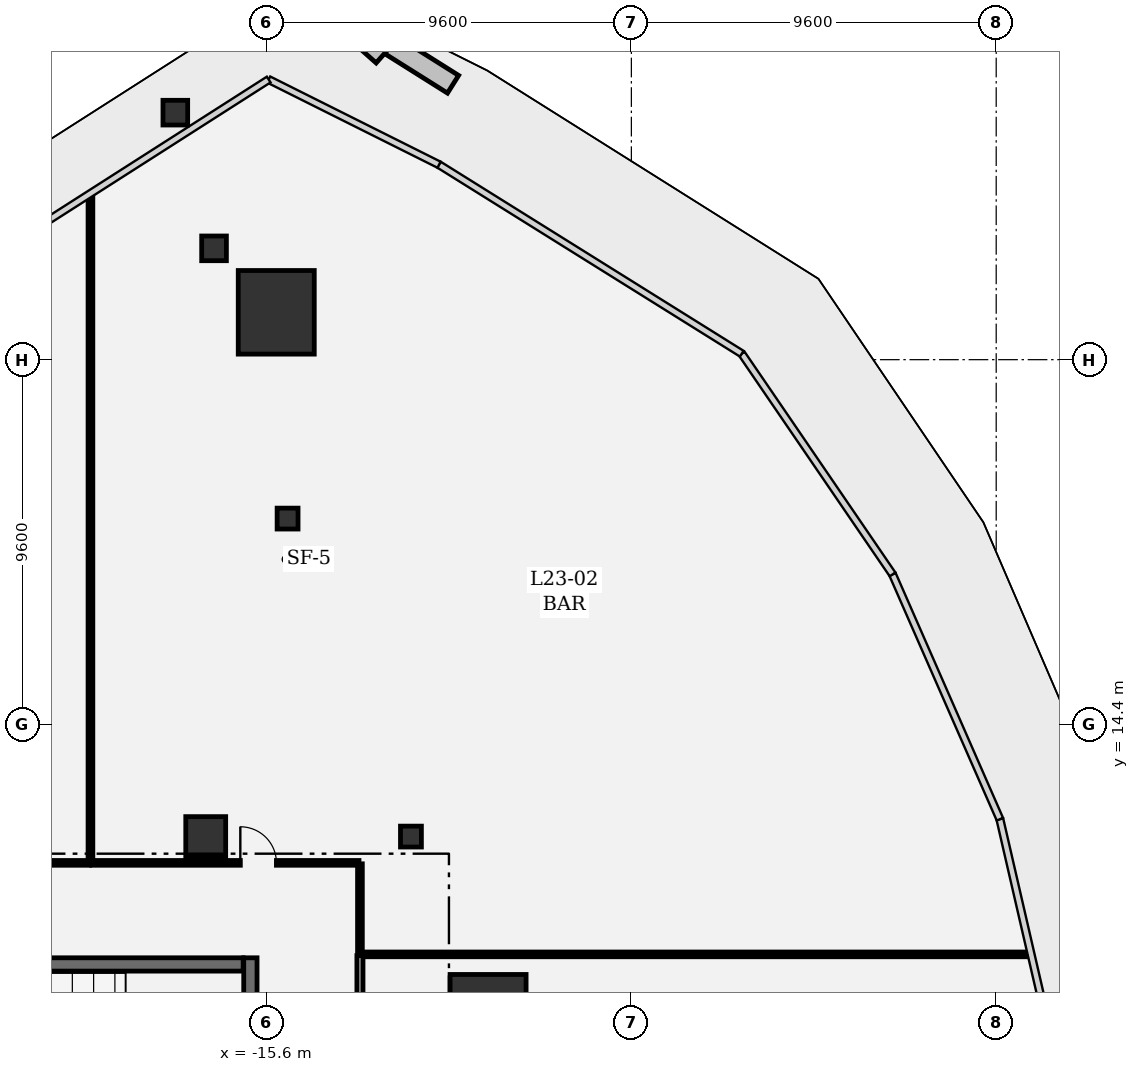
"""IFC4 building model, lengths in metres.
Left out: names, types, materials, properties, quantities, classifications, styles, units other than length and angle.
Written with IfcOpenShell. Run it as: python <this file> out.ifc"""

import sys

from ifc_helpers import new_model, si_unit, direction, frame, frame_2d, origin, origin_2d, place, context, subcontext, project, spatial, rectangle, extrude, element, fill, save


model = new_model("IFC4")
c1 = context("Model", 3, precision=1e-05, world=origin(), true_north=direction((0.0, 1.0)))
c2 = subcontext(c1, "Body", "Model", "MODEL_VIEW")
j1 = project(units=[si_unit("LENGTHUNIT", "METRE"), si_unit("PLANEANGLEUNIT", "RADIAN")], contexts=[c1])
p1 = place(None, origin())
s1 = spatial("IfcSite", under=j1, at=p1, CompositionType="ELEMENT")
p2 = place(p1, origin())
s2 = spatial("IfcBuilding", under=s1, at=p2, CompositionType="ELEMENT")
p3 = place(p2, frame((0.0, 0.0, 105.0)))
s3 = spatial("IfcBuildingStorey", under=s2, at=p3, CompositionType="ELEMENT", Elevation=105.0)
for number, where, z_axis, x_axis in (
    (1, (-9.77, 6.721, 0.0), (0.0, 0.0, 1.0), (1.0, 0.0, 0.0)),
    (2, (-15.344, 25.246, 0.0), (0.0, 0.0, 1.0), (1.0, 0.0, 0.0)),
):
    element("IfcColumn", number, at=place(p3, frame(where, z_axis=z_axis, x_axis=x_axis)), inside=s3, PredefinedType="COLUMN", context=c2, shape_type="SweptSolid", body=[
        extrude(rectangle(XDim=2.0, YDim=2.2, at=origin_2d()), origin(), (0.0, 0.0, 1.0), 4.8),
    ])
p4 = place(p3, frame((-17.2, 11.45, 0.0), z_axis=(0.0, 0.0, 1.0), x_axis=(1.0, 0.0, 0.0)))
e3 = element("IfcColumn", 3, at=p4, inside=s3, PredefinedType="COLUMN", context=c2, shape_type="SweptSolid", body=[
    extrude(rectangle(XDim=1.05, YDim=1.05, at=origin_2d()), origin(), (0.0, 0.0, 1.0), 4.8),
])
for number, where, z_axis, x_axis in (
    (4, (-18.0, 30.5, 0.0), (0.0, 0.0, 1.0), (1.0, 0.0, 0.0)),
    (5, (-16.981, 26.929, 0.0), (0.0, 0.0, 1.0), (1.0, 0.0, 0.0)),
):
    element("IfcColumn", number, at=place(p3, frame(where, z_axis=z_axis, x_axis=x_axis)), inside=s3, PredefinedType="COLUMN", context=c2, shape_type="SweptSolid", body=[
        extrude(rectangle(XDim=0.65, YDim=0.65, at=origin_2d()), origin(), (0.0, 0.0, 1.0), 4.8),
    ])
for number, where, z_axis, x_axis in (
    (6, (-15.046, 19.818, 0.0), (0.0, 0.0, 1.0), (1.0, 0.0, 0.0)),
    (7, (-11.8, 11.45, 0.0), (0.0, 0.0, 1.0), (1.0, 0.0, 0.0)),
):
    element("IfcColumn", number, at=place(p3, frame(where, z_axis=z_axis, x_axis=x_axis)), inside=s3, PredefinedType="COLUMN", context=c2, shape_type="SweptSolid", body=[
        extrude(rectangle(XDim=0.55, YDim=0.55, at=origin_2d()), origin(), (0.0, 0.0, 1.0), 4.8),
    ])
p5 = place(p3, frame((-16.025, 4.05, 0.0), z_axis=(0.0, 0.0, 1.0), x_axis=(0.0, 1.0, 0.0)))
e8 = element("IfcWall", 8, at=p5, inside=s3, PredefinedType="SHEAR", context=c2, shape_type="SweptSolid", body=[
    extrude(rectangle(XDim=4.21, YDim=0.35, at=frame_2d((2.105, 0.0))), origin(), (0.0, 0.0, 1.0), 4.52),
])
p6 = place(p3, frame((-16.215, 8.085, 0.0), z_axis=(0.0, 0.0, 1.0), x_axis=(-1.0, 0.0, 0.0)))
e9 = element("IfcWall", 9, at=p6, inside=s3, PredefinedType="SHEAR", context=c2, shape_type="SweptSolid", body=[
    extrude(rectangle(XDim=8.12, YDim=0.35, at=frame_2d((4.06, 0.0))), origin(), (0.0, 0.0, 1.0), 4.52),
])
p7 = place(p6, frame((6.74, 0.0, 0.0)))
e10 = element("IfcOpeningElement", 10, at=p7, cuts=e9, PredefinedType="OPENING", context=c2, shape_type="SweptSolid", body=[
    extrude(rectangle(XDim=1.1, YDim=2.2, at=frame_2d((0.55, 1.1))), frame((0.0, 0.185, 0.0), z_axis=(0.0, -1.0, 0.0), x_axis=(1.0, 0.0, 0.0)), (0.0, 0.0, 1.0), 0.37),
])
p8 = place(p3, frame((-40.633, 10.758, 0.0), z_axis=(0.0, 0.0, 1.0), x_axis=(1.0, 0.0, 0.0)))
e11 = element("IfcWall", 11, at=p8, inside=s3, PredefinedType="PARTITIONING", context=c2, shape_type="SweptSolid", body=[
    extrude(rectangle(XDim=20.375, YDim=0.125, at=frame_2d((10.188, 0.0))), origin(), (0.0, 0.0, 1.0), 3.64),
])
p9 = place(p8, frame((9.712, 0.0, 0.0)))
e12 = element("IfcOpeningElement", 12, at=p9, cuts=e11, PredefinedType="OPENING", context=c2, shape_type="SweptSolid", body=[
    extrude(rectangle(XDim=0.95, YDim=2.15, at=frame_2d((0.475, 1.075))), frame((0.0, 0.073, 0.0), z_axis=(0.0, -1.0, 0.0), x_axis=(1.0, 0.0, 0.0)), (0.0, 0.0, 1.0), 0.145),
])
p10 = place(p3, frame((-20.233, 10.783, 0.0), z_axis=(0.0, 0.0, 1.0), x_axis=(0.0, 1.0, 0.0)))
e13 = element("IfcWall", 13, at=p10, inside=s3, PredefinedType="PARTITIONING", context=c2, shape_type="SweptSolid", body=[
    extrude(rectangle(XDim=17.51, YDim=0.125, at=frame_2d((8.755, 0.0))), origin(), (0.0, 0.0, 1.0), 3.635),
])
p11 = place(p3, frame((-20.2, 10.758, 0.0), z_axis=(0.0, 0.0, 1.0), x_axis=(1.0, 0.0, 0.0)))
e14 = element("IfcWall", 14, at=p11, inside=s3, PredefinedType="PARTITIONING", context=c2, shape_type="SweptSolid", body=[
    extrude(rectangle(XDim=7.033, YDim=0.125, at=frame_2d((3.517, 0.0))), origin(), (0.0, 0.0, 1.0), 3.635),
])
p12 = place(p11, frame((3.911, 0.0, 0.0)))
e15 = element("IfcOpeningElement", 15, at=p12, cuts=e14, PredefinedType="OPENING", context=c2, shape_type="SweptSolid", body=[
    extrude(rectangle(XDim=0.95, YDim=2.15, at=frame_2d((0.475, 1.075))), frame((0.0, 0.073, 0.0), z_axis=(0.0, -1.0, 0.0), x_axis=(1.0, 0.0, 0.0)), (0.0, 0.0, 1.0), 0.145),
])
p13 = place(p3, frame((-13.142, 10.733, 0.0), z_axis=(0.0, 0.0, 1.0), x_axis=(0.0, -1.0, 0.0)))
e16 = element("IfcWall", 16, at=p13, inside=s3, PredefinedType="PARTITIONING", context=c2, shape_type="SweptSolid", body=[
    extrude(rectangle(XDim=2.358, YDim=0.125, at=frame_2d((1.179, 0.0))), origin(), (0.0, 0.0, 1.0), 4.52),
])
p14 = place(p3, frame((-13.117, 8.35, 0.0), z_axis=(0.0, 0.0, 1.0), x_axis=(1.0, 0.0, 0.0)))
e17 = element("IfcWall", 17, at=p14, inside=s3, PredefinedType="PARTITIONING", context=c2, shape_type="SweptSolid", body=[
    extrude(rectangle(XDim=17.556, YDim=0.125, at=frame_2d((8.778, 0.0))), origin(), (0.0, 0.0, 1.0), 3.635),
])
p15 = place(p3, frame((-13.142, 8.317, 0.0), z_axis=(0.0, 0.0, 1.0), x_axis=(0.0, -1.0, 0.0)))
e18 = element("IfcWall", 18, at=p15, inside=s3, PredefinedType="PARTITIONING", context=c2, shape_type="SweptSolid", body=[
    extrude(rectangle(XDim=4.216, YDim=0.16, at=frame_2d((2.108, 0.0))), origin(), (0.0, 0.0, 1.0), 4.52),
])
p16 = place(p15, frame((1.558, 0.0, 0.0)))
e19 = element("IfcOpeningElement", 19, at=p16, cuts=e18, PredefinedType="OPENING", context=c2, shape_type="SweptSolid", body=[
    extrude(rectangle(XDim=1.1, YDim=2.15, at=frame_2d((0.55, 1.075))), frame((0.0, 0.09, 0.0), z_axis=(0.0, -1.0, 0.0), x_axis=(1.0, 0.0, 0.0)), (0.0, 0.0, 1.0), 0.18),
])
p17 = place(p12, origin())
e20 = element("IfcDoor", 20, at=p17, inside=s3, OperationType="SINGLE_SWING_LEFT", PredefinedType="DOOR", context=c2, shape_type="SweptSolid", body=[
    extrude(rectangle(XDim=0.95, YDim=2.15, at=frame_2d((0.475, 1.075))), frame((0.0, 0.025, 0.0), z_axis=(0.0, -1.0, 0.0), x_axis=(1.0, 0.0, 0.0)), (0.0, 0.0, 1.0), 0.05),
])
fill(e15, e20)
save(model, sys.argv[1])
